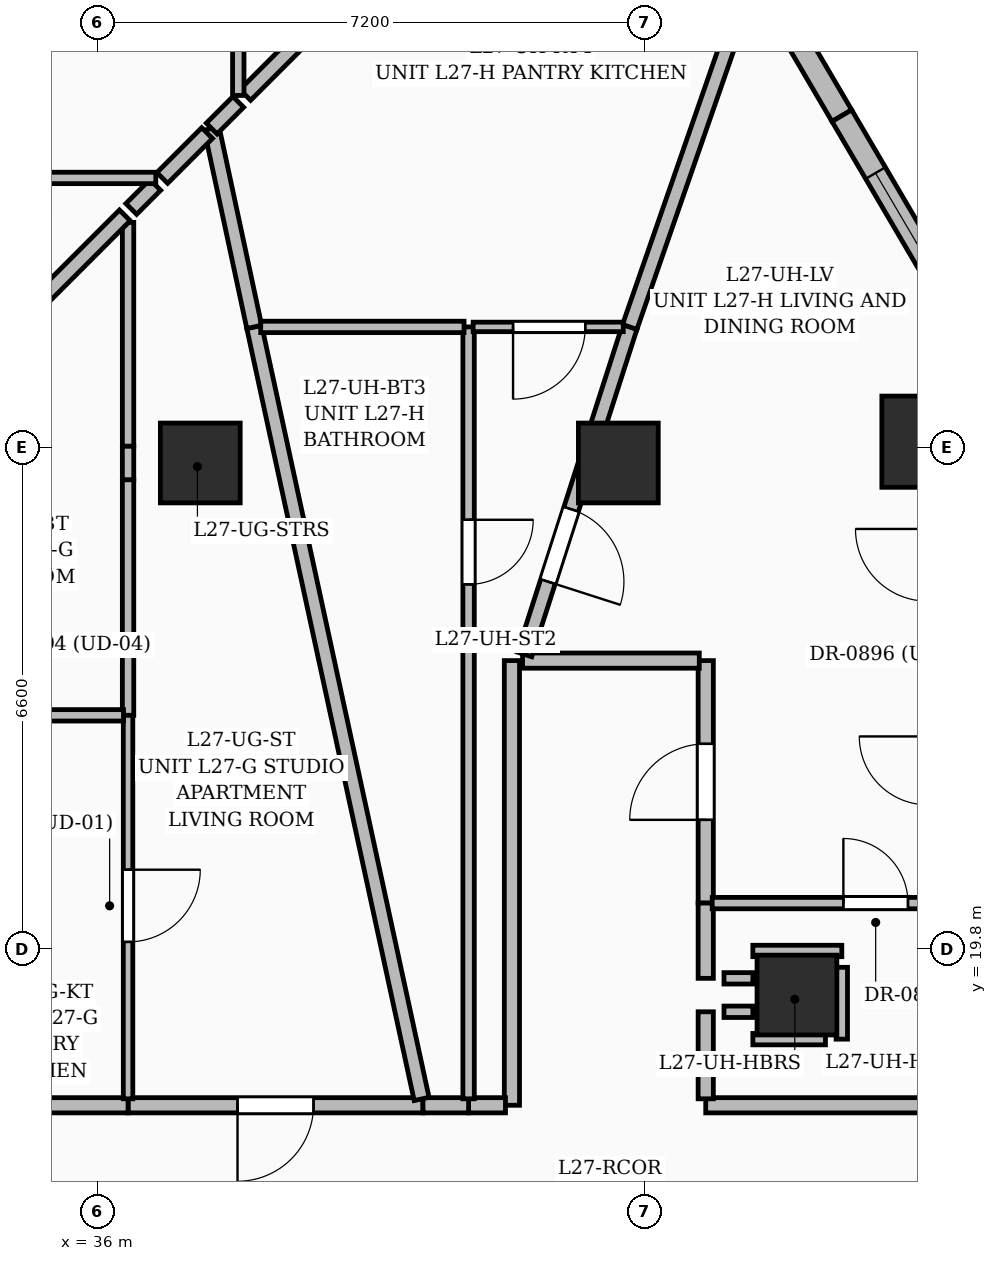
"""IFC4 building model, lengths in metres.
Left out: names, types, materials, properties, quantities, classifications, styles, units other than length and angle.
Written with IfcOpenShell. Run it as: python <this file> out.ifc"""

import sys

from ifc_helpers import new_model, si_unit, direction, frame, frame_2d, origin, origin_2d, place, context, subcontext, project, spatial, rectangle, extrude, element, fill, save


model = new_model("IFC4")
c1 = context("Model", 3, precision=1e-05, world=origin(), true_north=direction((0.0, 1.0)))
c2 = subcontext(c1, "Body", "Model", "MODEL_VIEW")
j1 = project(units=[si_unit("LENGTHUNIT", "METRE"), si_unit("PLANEANGLEUNIT", "RADIAN")], contexts=[c1])
p1 = place(None, origin())
s1 = spatial("IfcSite", under=j1, at=p1, CompositionType="ELEMENT")
p2 = place(p1, origin())
s2 = spatial("IfcBuilding", under=s1, at=p2, CompositionType="ELEMENT")
p3 = place(p2, frame((0.0, 0.0, 110.4)))
s3 = spatial("IfcBuildingStorey", under=s2, at=p3, CompositionType="ELEMENT", Elevation=110.4)
for number, where, z_axis, x_axis in (
    (1, (45.2, 19.2, 0.0), (0.0, 0.0, 1.0), (1.0, 0.0, 0.0)),
    (2, (42.85, 26.2, 0.0), (0.0, 0.0, 1.0), (1.0, 0.0, 0.0)),
    (3, (37.35, 26.2, 0.0), (0.0, 0.0, 1.0), (1.0, 0.0, 0.0)),
):
    element("IfcColumn", number, at=place(p3, frame(where, z_axis=z_axis, x_axis=x_axis)), inside=s3, PredefinedType="COLUMN", context=c2, shape_type="SweptSolid", body=[
        extrude(rectangle(XDim=1.05, YDim=1.05, at=origin_2d()), origin(), (0.0, 0.0, 1.0), 3.6),
    ])
p4 = place(p3, frame((46.917, 26.48, 0.0), z_axis=(0.0, 0.0, 1.0), x_axis=(1.0, 0.0, 0.0)))
e4 = element("IfcColumn", 4, at=p4, inside=s3, PredefinedType="COLUMN", context=c2, shape_type="SweptSolid", body=[
    extrude(rectangle(XDim=1.2, YDim=1.2, at=origin_2d()), origin(), (0.0, 0.0, 1.0), 3.6),
])
p5 = place(p3, frame((42.472, 36.42, 0.0), z_axis=(0.0, 0.0, 1.0), x_axis=(0.506315009763, -0.86234860172, 0.0)))
e5 = element("IfcWall", 5, at=p5, inside=s3, PredefinedType="SOLIDWALL", context=c2, shape_type="SweptSolid", body=[
    extrude(rectangle(XDim=6.553, YDim=0.3, at=frame_2d((3.277, 0.0))), origin(), (0.0, 0.0, 1.0), 3.35),
])
p6 = place(p5, frame((1.725, 0.0, 0.55)))
e6 = element("IfcOpeningElement", 6, at=p6, cuts=e5, PredefinedType="OPENING", context=c2, shape_type="SweptSolid", body=[
    extrude(rectangle(XDim=2.1, YDim=2.4, at=frame_2d((1.05, 1.2))), frame((0.0, 0.16, 0.0), z_axis=(0.0, -1.0, 0.0), x_axis=(1.0, 0.0, 0.0)), (0.0, 0.0, 1.0), 0.32),
])
p7 = place(p3, frame((45.791, 30.769, 0.0), z_axis=(0.0, 0.0, 1.0), x_axis=(0.506326446954, -0.862341886443, 0.0)))
e7 = element("IfcWall", 7, at=p7, inside=s3, PredefinedType="SOLIDWALL", context=c2, shape_type="SweptSolid", body=[
    extrude(rectangle(XDim=6.554, YDim=0.3, at=frame_2d((3.277, 0.0))), origin(), (0.0, 0.0, 1.0), 3.35),
])
p8 = place(p7, frame((0.875, 0.0, 0.6)))
e8 = element("IfcOpeningElement", 8, at=p8, cuts=e7, PredefinedType="OPENING", context=c2, shape_type="SweptSolid", body=[
    extrude(rectangle(XDim=1.8, YDim=2.1, at=frame_2d((0.9, 1.05))), frame((0.0, 0.16, 0.0), z_axis=(0.0, -1.0, 0.0), x_axis=(1.0, 0.0, 0.0)), (0.0, 0.0, 1.0), 0.32),
])
p9 = place(p7, frame((3.875, 0.0, 0.6)))
e9 = element("IfcOpeningElement", 9, at=p9, cuts=e7, PredefinedType="OPENING", context=c2, shape_type="SweptSolid", body=[
    extrude(rectangle(XDim=1.8, YDim=2.1, at=frame_2d((0.9, 1.05))), frame((0.0, 0.16, 0.0), z_axis=(0.0, -1.0, 0.0), x_axis=(1.0, 0.0, 0.0)), (0.0, 0.0, 1.0), 0.32),
])
p10 = place(p3, frame((40.28, 17.75, 0.0), z_axis=(0.0, 0.0, 1.0), x_axis=(-1.0, 0.0, 0.0)))
e10 = element("IfcWall", 10, at=p10, inside=s3, PredefinedType="PARTITIONING", context=c2, shape_type="SweptSolid", body=[
    extrude(rectangle(XDim=3.88, YDim=0.2, at=frame_2d((1.94, 0.0))), origin(), (0.0, 0.0, 1.0), 3.35),
])
p11 = place(p10, frame((1.44, 0.0, 0.0)))
e11 = element("IfcOpeningElement", 11, at=p11, cuts=e10, PredefinedType="OPENING", context=c2, shape_type="SweptSolid", body=[
    extrude(rectangle(XDim=1.0, YDim=2.2, at=frame_2d((0.5, 1.1))), frame((0.0, 0.11, 0.0), z_axis=(0.0, -1.0, 0.0), x_axis=(1.0, 0.0, 0.0)), (0.0, 0.0, 1.0), 0.22),
])
p12 = place(p3, frame((36.4, 17.75, 0.0), z_axis=(0.0, 0.0, 1.0), x_axis=(-1.0, 0.0, 0.0)))
e12 = element("IfcWall", 12, at=p12, inside=s3, PredefinedType="PARTITIONING", context=c2, shape_type="SweptSolid", body=[
    extrude(rectangle(XDim=3.0, YDim=0.2, at=frame_2d((1.5, 0.0))), origin(), (0.0, 0.0, 1.0), 2.436),
])
p13 = place(p3, frame((44.0, 20.41, 0.0), z_axis=(0.0, 0.0, 1.0), x_axis=(0.0, 1.0, 0.0)))
e13 = element("IfcWall", 13, at=p13, inside=s3, PredefinedType="PARTITIONING", context=c2, shape_type="SweptSolid", body=[
    extrude(rectangle(XDim=3.19, YDim=0.2, at=frame_2d((1.595, 0.0))), origin(), (0.0, 0.0, 1.0), 2.436),
])
p14 = place(p13, frame((1.095, 0.0, 0.0)))
e14 = element("IfcOpeningElement", 14, at=p14, cuts=e13, PredefinedType="OPENING", context=c2, shape_type="SweptSolid", body=[
    extrude(rectangle(XDim=1.0, YDim=2.2, at=frame_2d((0.5, 1.1))), frame((0.0, 0.11, 0.0), z_axis=(0.0, -1.0, 0.0), x_axis=(1.0, 0.0, 0.0)), (0.0, 0.0, 1.0), 0.22),
])
p15 = place(p3, frame((43.915, 23.6, 0.0), z_axis=(0.0, 0.0, 1.0), x_axis=(-1.0, 0.0, 0.0)))
e15 = element("IfcWall", 15, at=p15, inside=s3, PredefinedType="PARTITIONING", context=c2, shape_type="SweptSolid", body=[
    extrude(rectangle(XDim=2.325, YDim=0.2, at=frame_2d((1.163, 0.0))), origin(), (0.0, 0.0, 1.0), 2.436),
])
p16 = place(p3, frame((46.92, 17.75, 0.0), z_axis=(0.0, 0.0, 1.0), x_axis=(-1.0, 0.0, 0.0)))
e16 = element("IfcWall", 16, at=p16, inside=s3, PredefinedType="PARTITIONING", context=c2, shape_type="SweptSolid", body=[
    extrude(rectangle(XDim=2.92, YDim=0.2, at=frame_2d((1.46, 0.0))), origin(), (0.0, 0.0, 1.0), 2.436),
])
p17 = place(p3, frame((44.0, 17.835, 0.0), z_axis=(0.0, 0.0, 1.0), x_axis=(0.0, 1.0, 0.0)))
e17 = element("IfcWall", 17, at=p17, inside=s3, PredefinedType="PARTITIONING", context=c2, shape_type="SweptSolid", body=[
    extrude(rectangle(XDim=1.145, YDim=0.2, at=frame_2d((0.573, 0.0))), origin(), (0.0, 0.0, 1.0), 3.35),
])
p18 = place(p3, frame((44.0, 19.42, 0.0), z_axis=(0.0, 0.0, 1.0), x_axis=(0.0, 1.0, 0.0)))
e18 = element("IfcWall", 18, at=p18, inside=s3, PredefinedType="PARTITIONING", context=c2, shape_type="SweptSolid", body=[
    extrude(rectangle(XDim=0.99, YDim=0.2, at=frame_2d((0.495, 0.0))), origin(), (0.0, 0.0, 1.0), 3.35),
])
p19 = place(p3, frame((41.45, 23.6, 0.0), z_axis=(0.0, 0.0, 1.0), x_axis=(0.0, -1.0, 0.0)))
e19 = element("IfcWall", 19, at=p19, inside=s3, PredefinedType="PARTITIONING", context=c2, shape_type="SweptSolid", body=[
    extrude(rectangle(XDim=5.85, YDim=0.2, at=frame_2d((2.925, 0.0))), origin(), (0.0, 0.0, 1.0), 3.35),
])
p20 = place(p3, frame((41.365, 17.75, 0.0), z_axis=(0.0, 0.0, 1.0), x_axis=(-1.0, 0.0, 0.0)))
e20 = element("IfcWall", 20, at=p20, inside=s3, PredefinedType="PARTITIONING", context=c2, shape_type="SweptSolid", body=[
    extrude(rectangle(XDim=0.485, YDim=0.2, at=frame_2d((0.243, 0.0))), origin(), (0.0, 0.0, 1.0), 3.35),
])
p21 = place(p3, frame((40.88, 17.75, 0.0), z_axis=(0.0, 0.0, 1.0), x_axis=(-1.0, 0.0, 0.0)))
e21 = element("IfcWall", 21, at=p21, inside=s3, PredefinedType="PARTITIONING", context=c2, shape_type="SweptSolid", body=[
    extrude(rectangle(XDim=0.6, YDim=0.2, at=frame_2d((0.3, 0.0))), origin(), (0.0, 0.0, 1.0), 3.35),
])
p22 = place(p3, frame((36.4, 25.98, 0.0), z_axis=(0.0, 0.0, 1.0), x_axis=(0.0, -1.0, 0.0)))
e22 = element("IfcWall", 22, at=p22, inside=s3, PredefinedType="PARTITIONING", context=c2, shape_type="SweptSolid", body=[
    extrude(rectangle(XDim=3.1, YDim=0.15, at=frame_2d((1.55, 0.0))), origin(), (0.0, 0.0, 1.0), 2.436),
])
p23 = place(p3, frame((36.4, 29.365, 0.0), z_axis=(0.0, 0.0, 1.0), x_axis=(0.0, -1.0, 0.0)))
e23 = element("IfcWall", 23, at=p23, inside=s3, PredefinedType="PARTITIONING", context=c2, shape_type="SweptSolid", body=[
    extrude(rectangle(XDim=2.945, YDim=0.15, at=frame_2d((1.473, 0.0))), origin(), (0.0, 0.0, 1.0), 2.372),
])
p24 = place(p3, frame((36.4, 22.88, 0.0), z_axis=(0.0, 0.0, 1.0), x_axis=(0.0, -1.0, 0.0)))
e24 = element("IfcWall", 24, at=p24, inside=s3, PredefinedType="PARTITIONING", context=c2, shape_type="SweptSolid", body=[
    extrude(rectangle(XDim=5.045, YDim=0.125, at=frame_2d((2.522, 0.0))), origin(), (0.0, 0.0, 1.0), 3.35),
])
p25 = place(p24, frame((2.031, 0.0, 0.0)))
e25 = element("IfcOpeningElement", 25, at=p25, cuts=e24, PredefinedType="OPENING", context=c2, shape_type="SweptSolid", body=[
    extrude(rectangle(XDim=0.95, YDim=2.2, at=frame_2d((0.475, 1.1))), frame((0.0, 0.072, 0.0), z_axis=(0.0, -1.0, 0.0), x_axis=(1.0, 0.0, 0.0)), (0.0, 0.0, 1.0), 0.145),
])
p26 = place(p3, frame((40.262, 17.833, 0.0), z_axis=(0.0, 0.0, 1.0), x_axis=(-0.211865908249, 0.977298744971, 0.0)))
e26 = element("IfcWall", 26, at=p26, inside=s3, PredefinedType="PARTITIONING", context=c2, shape_type="SweptSolid", body=[
    extrude(rectangle(XDim=10.393, YDim=0.2, at=frame_2d((5.196, 0.0))), origin(), (0.0, 0.0, 1.0), 2.436),
])
p27 = place(p3, frame((38.06, 27.99, 0.0), z_axis=(0.0, 0.0, 1.0), x_axis=(-0.209797646084, 0.977744827497, 0.0)))
e27 = element("IfcWall", 27, at=p27, inside=s3, PredefinedType="PARTITIONING", context=c2, shape_type="SweptSolid", body=[
    extrude(rectangle(XDim=2.669, YDim=0.2, at=frame_2d((1.335, 0.0))), origin(), (0.0, 0.0, 1.0), 2.709),
])
p28 = place(p3, frame((37.44, 30.54, 0.0), z_axis=(0.0, 0.0, 1.0), x_axis=(-0.707106781187, -0.707106781187, 0.0)))
e28 = element("IfcWall", 28, at=p28, inside=s3, PredefinedType="PARTITIONING", context=c2, shape_type="SweptSolid", body=[
    extrude(rectangle(XDim=0.834, YDim=0.2, at=frame_2d((0.417, 0.0))), origin(), (0.0, 0.0, 1.0), 2.709),
])
p29 = place(p3, frame((36.758, 29.858, 0.0), z_axis=(0.0, 0.0, 1.0), x_axis=(-0.707106781187, -0.707106781187, 0.0)))
e29 = element("IfcWall", 29, at=p29, inside=s3, PredefinedType="PARTITIONING", context=c2, shape_type="SweptSolid", body=[
    extrude(rectangle(XDim=0.447, YDim=0.2, at=frame_2d((0.223, 0.0))), origin(), (0.0, 0.0, 1.0), 3.35),
])
p30 = place(p3, frame((33.4, 22.88, 0.0), z_axis=(0.0, 0.0, 1.0), x_axis=(1.0, 0.0, 0.0)))
e30 = element("IfcWall", 30, at=p30, inside=s3, PredefinedType="PARTITIONING", context=c2, shape_type="SweptSolid", body=[
    extrude(rectangle(XDim=2.94, YDim=0.15, at=frame_2d((1.47, 0.0))), origin(), (0.0, 0.0, 1.0), 2.436),
])
p31 = place(p30, frame((1.075, 0.0, 0.0)))
e31 = element("IfcOpeningElement", 31, at=p31, cuts=e30, PredefinedType="OPENING", context=c2, shape_type="SweptSolid", body=[
    extrude(rectangle(XDim=0.85, YDim=2.1, at=frame_2d((0.425, 1.05))), frame((0.0, 0.085, 0.0), z_axis=(0.0, -1.0, 0.0), x_axis=(1.0, 0.0, 0.0)), (0.0, 0.0, 1.0), 0.17),
])
p32 = place(p3, frame((36.358, 29.458, 0.0), z_axis=(0.0, 0.0, 1.0), x_axis=(-0.707137163672, -0.707076397395, 0.0)))
e32 = element("IfcWall", 32, at=p32, inside=s3, PredefinedType="PARTITIONING", context=c2, shape_type="SweptSolid", body=[
    extrude(rectangle(XDim=4.018, YDim=0.2, at=frame_2d((2.009, 0.0))), origin(), (0.0, 0.0, 1.0), 2.372),
])
p33 = place(p3, frame((44.085, 20.41, 0.0), z_axis=(0.0, 0.0, 1.0), x_axis=(1.0, 0.0, 0.0)))
e33 = element("IfcWall", 33, at=p33, inside=s3, PredefinedType="PARTITIONING", context=c2, shape_type="SweptSolid", body=[
    extrude(rectangle(XDim=2.835, YDim=0.15, at=frame_2d((1.417, 0.0))), origin(), (0.0, 0.0, 1.0), 2.372),
])
p34 = place(p33, frame((1.726, 0.0, 0.0)))
e34 = element("IfcOpeningElement", 34, at=p34, cuts=e33, PredefinedType="OPENING", context=c2, shape_type="SweptSolid", body=[
    extrude(rectangle(XDim=0.85, YDim=2.1, at=frame_2d((0.425, 1.05))), frame((0.0, 0.085, 0.0), z_axis=(0.0, -1.0, 0.0), x_axis=(1.0, 0.0, 0.0)), (0.0, 0.0, 1.0), 0.17),
])
p35 = place(p3, frame((43.0, 27.99, 0.0), z_axis=(0.0, 0.0, 1.0), x_axis=(-0.305803129518, -0.95209476733, 0.0)))
e35 = element("IfcWall", 35, at=p35, inside=s3, PredefinedType="PARTITIONING", context=c2, shape_type="SweptSolid", body=[
    extrude(rectangle(XDim=4.526, YDim=0.2, at=frame_2d((2.263, 0.0))), origin(), (0.0, 0.0, 1.0), 2.372),
])
p36 = place(p35, frame((2.519, 0.0, 0.0)))
e36 = element("IfcOpeningElement", 36, at=p36, cuts=e35, PredefinedType="OPENING", context=c2, shape_type="SweptSolid", body=[
    extrude(rectangle(XDim=1.0, YDim=2.2, at=frame_2d((0.5, 1.1))), frame((0.0, 0.11, 0.0), z_axis=(0.0, -1.0, 0.0), x_axis=(1.0, 0.0, 0.0)), (0.0, 0.0, 1.0), 0.22),
])
p37 = place(p3, frame((44.581, 32.542, 0.0), z_axis=(0.0, 0.0, 1.0), x_axis=(-0.328103998337, -0.944641607318, 0.0)))
e37 = element("IfcWall", 37, at=p37, inside=s3, PredefinedType="PARTITIONING", context=c2, shape_type="SweptSolid", body=[
    extrude(rectangle(XDim=4.819, YDim=0.2, at=frame_2d((2.409, 0.0))), origin(), (0.0, 0.0, 1.0), 2.57),
])
p38 = place(p3, frame((40.88, 27.99, 0.0), z_axis=(0.0, 0.0, 1.0), x_axis=(0.0, -1.0, 0.0)))
e38 = element("IfcWall", 38, at=p38, inside=s3, PredefinedType="PARTITIONING", context=c2, shape_type="SweptSolid", body=[
    extrude(rectangle(XDim=10.155, YDim=0.15, at=frame_2d((5.078, 0.0))), origin(), (0.0, 0.0, 1.0), 2.436),
])
p39 = place(p38, frame((2.537, 0.0, 0.0)))
e39 = element("IfcOpeningElement", 39, at=p39, cuts=e38, PredefinedType="OPENING", context=c2, shape_type="SweptSolid", body=[
    extrude(rectangle(XDim=0.85, YDim=2.1, at=frame_2d((0.425, 1.05))), frame((0.0, 0.085, 0.0), z_axis=(0.0, -1.0, 0.0), x_axis=(1.0, 0.0, 0.0)), (0.0, 0.0, 1.0), 0.17),
])
p40 = place(p3, frame((42.915, 27.99, 0.0), z_axis=(0.0, 0.0, 1.0), x_axis=(-1.0, 0.0, 0.0)))
e40 = element("IfcWall", 40, at=p40, inside=s3, PredefinedType="PARTITIONING", context=c2, shape_type="SweptSolid", body=[
    extrude(rectangle(XDim=1.975, YDim=0.125, at=frame_2d((0.988, 0.0))), origin(), (0.0, 0.0, 1.0), 2.372),
])
p41 = place(p40, frame((0.5, 0.0, 0.0)))
e41 = element("IfcOpeningElement", 41, at=p41, cuts=e40, PredefinedType="OPENING", context=c2, shape_type="SweptSolid", body=[
    extrude(rectangle(XDim=0.95, YDim=2.2, at=frame_2d((0.475, 1.1))), frame((0.0, 0.072, 0.0), z_axis=(0.0, -1.0, 0.0), x_axis=(1.0, 0.0, 0.0)), (0.0, 0.0, 1.0), 0.145),
])
p42 = place(p3, frame((40.82, 27.99, 0.0), z_axis=(0.0, 0.0, 1.0), x_axis=(-1.0, 0.0, 0.0)))
e42 = element("IfcWall", 42, at=p42, inside=s3, PredefinedType="PARTITIONING", context=c2, shape_type="SweptSolid", body=[
    extrude(rectangle(XDim=2.675, YDim=0.15, at=frame_2d((1.337, 0.0))), origin(), (0.0, 0.0, 1.0), 3.35),
])
p43 = place(p3, frame((37.85, 30.95, 0.0), z_axis=(0.0, 0.0, 1.0), x_axis=(-0.707353374636, -0.706860101711, 0.0)))
e43 = element("IfcWall", 43, at=p43, inside=s3, PredefinedType="PARTITIONING", context=c2, shape_type="SweptSolid", body=[
    extrude(rectangle(XDim=0.495, YDim=0.2, at=frame_2d((0.248, 0.0))), origin(), (0.0, 0.0, 1.0), 2.709),
])
p44 = place(p3, frame((41.684, 34.784, 0.0), z_axis=(0.0, 0.0, 1.0), x_axis=(-0.707106781187, -0.707106781187, 0.0)))
e44 = element("IfcWall", 44, at=p44, inside=s3, PredefinedType="PARTITIONING", context=c2, shape_type="SweptSolid", body=[
    extrude(rectangle(XDim=5.292, YDim=0.2, at=frame_2d((2.646, 0.0))), origin(), (0.0, 0.0, 1.0), 2.709),
])
p45 = place(p3, frame((33.485, 29.95, 0.0), z_axis=(0.0, 0.0, 1.0), x_axis=(1.0, 0.0, 0.0)))
e45 = element("IfcWall", 45, at=p45, inside=s3, PredefinedType="PARTITIONING", context=c2, shape_type="SweptSolid", body=[
    extrude(rectangle(XDim=3.28, YDim=0.15, at=frame_2d((1.64, 0.0))), origin(), (0.0, 0.0, 1.0), 2.372),
])
p46 = place(p3, frame((37.85, 31.035, 0.0), z_axis=(0.0, 0.0, 1.0), x_axis=(0.0, 1.0, 0.0)))
e46 = element("IfcWall", 46, at=p46, inside=s3, PredefinedType="PARTITIONING", context=c2, shape_type="SweptSolid", body=[
    extrude(rectangle(XDim=3.855, YDim=0.15, at=frame_2d((1.927, 0.0))), origin(), (0.0, 0.0, 1.0), 2.709),
])
p47 = place(p3, frame((36.4, 25.98, 0.0), z_axis=(0.0, 0.0, 1.0), x_axis=(0.0, 1.0, 0.0)))
e47 = element("IfcWall", 47, at=p47, inside=s3, PredefinedType="PARTITIONING", context=c2, shape_type="SweptSolid", body=[
    extrude(rectangle(XDim=0.44, YDim=0.15, at=frame_2d((0.22, 0.0))), origin(), (0.0, 0.0, 1.0), 3.35),
])
p48 = place(p3, frame((44.24, 19.42, 0.0), z_axis=(0.0, 0.0, 1.0), x_axis=(1.0, 0.0, 0.0)))
e48 = element("IfcWall", 48, at=p48, inside=s3, PredefinedType="PARTITIONING", context=c2, shape_type="SweptSolid", body=[
    extrude(rectangle(XDim=0.38, YDim=0.15, at=frame_2d((0.19, 0.0))), origin(), (0.0, 0.0, 1.0), 3.35),
])
p49 = place(p3, frame((44.62, 19.78, 0.0), z_axis=(0.0, 0.0, 1.0), x_axis=(1.0, 0.0, 0.0)))
e49 = element("IfcWall", 49, at=p49, inside=s3, PredefinedType="PARTITIONING", context=c2, shape_type="SweptSolid", body=[
    extrude(rectangle(XDim=1.17, YDim=0.15, at=frame_2d((0.585, 0.0))), origin(), (0.0, 0.0, 1.0), 2.372),
])
p50 = place(p3, frame((45.79, 19.565, 0.0), z_axis=(0.0, 0.0, 1.0), x_axis=(0.0, -1.0, 0.0)))
e50 = element("IfcWall", 50, at=p50, inside=s3, PredefinedType="PARTITIONING", context=c2, shape_type="SweptSolid", body=[
    extrude(rectangle(XDim=0.945, YDim=0.15, at=frame_2d((0.472, 0.0))), origin(), (0.0, 0.0, 1.0), 3.35),
])
p51 = place(p3, frame((45.575, 18.62, 0.0), z_axis=(0.0, 0.0, 1.0), x_axis=(-1.0, 0.0, 0.0)))
e51 = element("IfcWall", 51, at=p51, inside=s3, PredefinedType="PARTITIONING", context=c2, shape_type="SweptSolid", body=[
    extrude(rectangle(XDim=0.955, YDim=0.15, at=frame_2d((0.478, 0.0))), origin(), (0.0, 0.0, 1.0), 2.436),
])
p52 = place(p3, frame((44.62, 18.98, 0.0), z_axis=(0.0, 0.0, 1.0), x_axis=(-1.0, 0.0, 0.0)))
e52 = element("IfcWall", 52, at=p52, inside=s3, PredefinedType="PARTITIONING", context=c2, shape_type="SweptSolid", body=[
    extrude(rectangle(XDim=0.38, YDim=0.15, at=frame_2d((0.19, 0.0))), origin(), (0.0, 0.0, 1.0), 3.35),
])
p53 = place(p8, origin())
e53 = element("IfcWindow", 53, at=p53, inside=s3, PartitioningType="SINGLE_PANEL", PredefinedType="WINDOW", context=c2, shape_type="SweptSolid", body=[
    extrude(rectangle(XDim=1.8, YDim=2.1, at=frame_2d((0.9, 1.05))), frame((0.0, 0.03, 0.0), z_axis=(0.0, -1.0, 0.0), x_axis=(1.0, 0.0, 0.0)), (0.0, 0.0, 1.0), 0.06),
])
fill(e8, e53)
p54 = place(p11, origin())
e54 = element("IfcDoor", 54, at=p54, inside=s3, OperationType="SINGLE_SWING_RIGHT", PredefinedType="DOOR", context=c2, shape_type="SweptSolid", body=[
    extrude(rectangle(XDim=1.0, YDim=2.2, at=frame_2d((0.5, 1.1))), frame((0.0, 0.025, 0.0), z_axis=(0.0, -1.0, 0.0), x_axis=(1.0, 0.0, 0.0)), (0.0, 0.0, 1.0), 0.05),
])
fill(e11, e54)
p55 = place(p25, origin())
e55 = element("IfcDoor", 55, at=p55, inside=s3, OperationType="SINGLE_SWING_LEFT", PredefinedType="DOOR", context=c2, shape_type="SweptSolid", body=[
    extrude(rectangle(XDim=0.95, YDim=2.2, at=frame_2d((0.475, 1.1))), frame((0.0, 0.025, 0.0), z_axis=(0.0, -1.0, 0.0), x_axis=(1.0, 0.0, 0.0)), (0.0, 0.0, 1.0), 0.05),
])
fill(e25, e55)
p56 = place(p14, origin())
e56 = element("IfcDoor", 56, at=p56, inside=s3, OperationType="SINGLE_SWING_LEFT", PredefinedType="DOOR", context=c2, shape_type="SweptSolid", body=[
    extrude(rectangle(XDim=1.0, YDim=2.2, at=frame_2d((0.5, 1.1))), frame((0.0, 0.025, 0.0), z_axis=(0.0, -1.0, 0.0), x_axis=(1.0, 0.0, 0.0)), (0.0, 0.0, 1.0), 0.05),
])
fill(e14, e56)
p57 = place(p34, origin())
e57 = element("IfcDoor", 57, at=p57, inside=s3, OperationType="SINGLE_SWING_LEFT", PredefinedType="DOOR", context=c2, shape_type="SweptSolid", body=[
    extrude(rectangle(XDim=0.85, YDim=2.1, at=frame_2d((0.425, 1.05))), frame((0.0, 0.025, 0.0), z_axis=(0.0, -1.0, 0.0), x_axis=(1.0, 0.0, 0.0)), (0.0, 0.0, 1.0), 0.05),
])
fill(e34, e57)
p58 = place(p41, origin())
e58 = element("IfcDoor", 58, at=p58, inside=s3, OperationType="SINGLE_SWING_RIGHT", PredefinedType="DOOR", context=c2, shape_type="SweptSolid", body=[
    extrude(rectangle(XDim=0.95, YDim=2.2, at=frame_2d((0.475, 1.1))), frame((0.0, 0.025, 0.0), z_axis=(0.0, -1.0, 0.0), x_axis=(1.0, 0.0, 0.0)), (0.0, 0.0, 1.0), 0.05),
])
fill(e41, e58)
p59 = place(p39, origin())
e59 = element("IfcDoor", 59, at=p59, inside=s3, OperationType="SINGLE_SWING_LEFT", PredefinedType="DOOR", context=c2, shape_type="SweptSolid", body=[
    extrude(rectangle(XDim=0.85, YDim=2.1, at=frame_2d((0.425, 1.05))), frame((0.0, 0.025, 0.0), z_axis=(0.0, -1.0, 0.0), x_axis=(1.0, 0.0, 0.0)), (0.0, 0.0, 1.0), 0.05),
])
fill(e39, e59)
p60 = place(p36, origin())
e60 = element("IfcDoor", 60, at=p60, inside=s3, OperationType="SINGLE_SWING_RIGHT", PredefinedType="DOOR", context=c2, shape_type="SweptSolid", body=[
    extrude(rectangle(XDim=1.0, YDim=2.2, at=frame_2d((0.5, 1.1))), frame((0.0, 0.025, 0.0), z_axis=(0.0, -1.0, 0.0), x_axis=(1.0, 0.0, 0.0)), (0.0, 0.0, 1.0), 0.05),
])
fill(e36, e60)
save(model, sys.argv[1])
